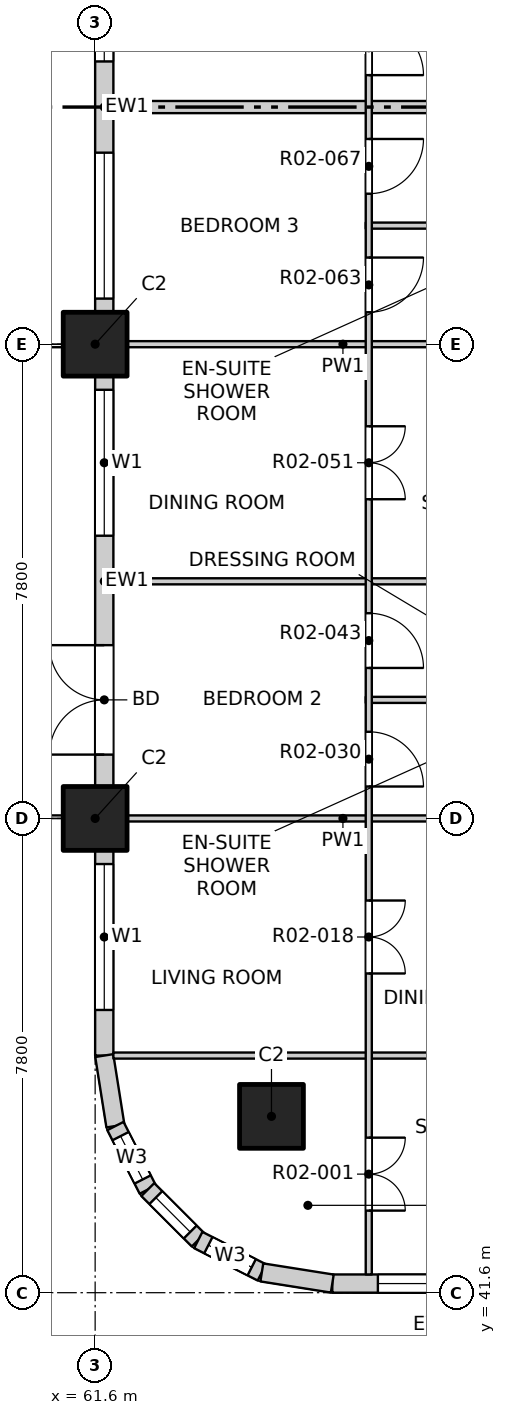
"""IFC4 building model, lengths in metres.
Left out: names, types, materials, properties, quantities, classifications, styles, units other than length and angle.
Written with IfcOpenShell. Run it as: python <this file> out.ifc"""

import sys

from ifc_helpers import new_model, si_unit, direction, frame, frame_2d, origin, origin_2d, place, context, subcontext, project, spatial, rectangle, extrude, element, fill, save


model = new_model("IFC4")
c1 = context("Model", 3, precision=1e-05, world=origin(), true_north=direction((0.0, 1.0)))
c2 = subcontext(c1, "Body", "Model", "MODEL_VIEW")
j1 = project(units=[si_unit("LENGTHUNIT", "METRE"), si_unit("PLANEANGLEUNIT", "RADIAN")], contexts=[c1])
p1 = place(None, origin())
s1 = spatial("IfcSite", under=j1, at=p1, CompositionType="ELEMENT")
p2 = place(p1, origin())
s2 = spatial("IfcBuilding", under=s1, at=p2, CompositionType="ELEMENT")
p3 = place(p2, frame((0.0, 0.0, 29.7)))
s3 = spatial("IfcBuildingStorey", under=s2, at=p3, CompositionType="ELEMENT", Elevation=29.7)
for number, where, z_axis, x_axis in (
    (1, (64.5, 44.5, -0.25), (0.0, 0.0, 1.0), (1.0, 0.0, 0.0)),
    (2, (61.6, 49.4, -0.25), (0.0, 0.0, 1.0), (1.0, 0.0, 0.0)),
    (3, (61.6, 57.2, -0.25), (0.0, 0.0, 1.0), (1.0, 0.0, 0.0)),
):
    element("IfcColumn", number, at=place(p3, frame(where, z_axis=z_axis, x_axis=x_axis)), inside=s3, PredefinedType="COLUMN", context=c2, shape_type="SweptSolid", body=[
        extrude(rectangle(XDim=1.05, YDim=1.05, at=origin_2d()), origin(), (0.0, 0.0, 1.0), 3.4),
    ])
p4 = place(p3, frame((65.5, 41.75, 0.0), z_axis=(0.0, 0.0, 1.0), x_axis=(1.0, 0.0, 0.0)))
e4 = element("IfcWall", 4, at=p4, inside=s3, PredefinedType="SOLIDWALL", context=c2, shape_type="SweptSolid", body=[
    extrude(rectangle(XDim=3.375, YDim=0.3, at=frame_2d((1.688, 0.0))), origin(), (0.0, 0.0, 1.0), 2.7),
])
p5 = place(p4, frame((0.75, 0.0, 0.9)))
e5 = element("IfcOpeningElement", 5, at=p5, cuts=e4, PredefinedType="OPENING", context=c2, shape_type="SweptSolid", body=[
    extrude(rectangle(XDim=2.4, YDim=1.8, at=frame_2d((1.2, 0.9))), frame((0.0, 0.16, 0.0), z_axis=(0.0, -1.0, 0.0), x_axis=(1.0, 0.0, 0.0)), (0.0, 0.0, 1.0), 0.32),
])
p6 = place(p3, frame((61.75, 45.5, 0.0), z_axis=(0.0, 0.0, 1.0), x_axis=(0.0, 1.0, 0.0)))
e6 = element("IfcWall", 6, at=p6, inside=s3, PredefinedType="SOLIDWALL", context=c2, shape_type="SweptSolid", body=[
    extrude(rectangle(XDim=3.375, YDim=0.3, at=frame_2d((1.688, 0.0))), origin(), (0.0, 0.0, 1.0), 2.7),
])
p7 = place(p6, frame((0.75, 0.0, 0.9)))
e7 = element("IfcOpeningElement", 7, at=p7, cuts=e6, PredefinedType="OPENING", context=c2, shape_type="SweptSolid", body=[
    extrude(rectangle(XDim=2.4, YDim=1.8, at=frame_2d((1.2, 0.9))), frame((0.0, 0.16, 0.0), z_axis=(0.0, -1.0, 0.0), x_axis=(1.0, 0.0, 0.0)), (0.0, 0.0, 1.0), 0.32),
])
p8 = place(p3, frame((61.75, 49.925, 0.0), z_axis=(0.0, 0.0, 1.0), x_axis=(0.0, 1.0, 0.0)))
e8 = element("IfcWall", 8, at=p8, inside=s3, PredefinedType="SOLIDWALL", context=c2, shape_type="SweptSolid", body=[
    extrude(rectangle(XDim=6.75, YDim=0.3, at=frame_2d((3.375, 0.0))), origin(), (0.0, 0.0, 1.0), 2.7),
])
p9 = place(p8, frame((0.525, 0.0, 0.0)))
e9 = element("IfcOpeningElement", 9, at=p9, cuts=e8, PredefinedType="OPENING", context=c2, shape_type="SweptSolid", body=[
    extrude(rectangle(XDim=1.8, YDim=2.4, at=frame_2d((0.9, 1.2))), frame((0.0, 0.16, 0.0), z_axis=(0.0, -1.0, 0.0), x_axis=(1.0, 0.0, 0.0)), (0.0, 0.0, 1.0), 0.32),
])
p10 = place(p8, frame((4.125, 0.0, 0.9)))
e10 = element("IfcOpeningElement", 10, at=p10, cuts=e8, PredefinedType="OPENING", context=c2, shape_type="SweptSolid", body=[
    extrude(rectangle(XDim=2.4, YDim=1.8, at=frame_2d((1.2, 0.9))), frame((0.0, 0.16, 0.0), z_axis=(0.0, -1.0, 0.0), x_axis=(1.0, 0.0, 0.0)), (0.0, 0.0, 1.0), 0.32),
])
p11 = place(p3, frame((61.75, 57.725, 0.0), z_axis=(0.0, 0.0, 1.0), x_axis=(0.0, 1.0, 0.0)))
e11 = element("IfcWall", 11, at=p11, inside=s3, PredefinedType="SOLIDWALL", context=c2, shape_type="SweptSolid", body=[
    extrude(rectangle(XDim=6.75, YDim=0.3, at=frame_2d((3.375, 0.0))), origin(), (0.0, 0.0, 1.0), 2.7),
])
p12 = place(p11, frame((0.225, 0.0, 0.9)))
e12 = element("IfcOpeningElement", 12, at=p12, cuts=e11, PredefinedType="OPENING", context=c2, shape_type="SweptSolid", body=[
    extrude(rectangle(XDim=2.4, YDim=1.8, at=frame_2d((1.2, 0.9))), frame((0.0, 0.16, 0.0), z_axis=(0.0, -1.0, 0.0), x_axis=(1.0, 0.0, 0.0)), (0.0, 0.0, 1.0), 0.32),
])
p13 = place(p11, frame((4.125, 0.0, 0.9)))
e13 = element("IfcOpeningElement", 13, at=p13, cuts=e11, PredefinedType="OPENING", context=c2, shape_type="SweptSolid", body=[
    extrude(rectangle(XDim=2.4, YDim=1.8, at=frame_2d((1.2, 0.9))), frame((0.0, 0.16, 0.0), z_axis=(0.0, -1.0, 0.0), x_axis=(1.0, 0.0, 0.0)), (0.0, 0.0, 1.0), 0.32),
])
p14 = place(p3, frame((61.75, 45.5, 0.0), z_axis=(0.0, 0.0, 1.0), x_axis=(0.156496880861, -0.987678452879, 0.0)))
e14 = element("IfcWall", 14, at=p14, inside=s3, PredefinedType="SOLIDWALL", context=c2, shape_type="SweptSolid", body=[
    extrude(rectangle(XDim=1.173, YDim=0.3, at=frame_2d((0.586, 0.0))), origin(), (0.0, 0.0, 1.0), 2.7),
])
p15 = place(p3, frame((61.934, 44.341, 0.0), z_axis=(0.0, 0.0, 1.0), x_axis=(0.454025524128, -0.890988677504, 0.0)))
e15 = element("IfcWall", 15, at=p15, inside=s3, PredefinedType="SOLIDWALL", context=c2, shape_type="SweptSolid", body=[
    extrude(rectangle(XDim=1.173, YDim=0.3, at=frame_2d((0.587, 0.0))), origin(), (0.0, 0.0, 1.0), 2.7),
])
p16 = place(p15, frame((0.187, 0.0, 0.9)))
e16 = element("IfcOpeningElement", 16, at=p16, cuts=e15, PredefinedType="OPENING", context=c2, shape_type="SweptSolid", body=[
    extrude(rectangle(XDim=0.8, YDim=1.2, at=frame_2d((0.4, 0.6))), frame((0.0, 0.16, 0.0), z_axis=(0.0, -1.0, 0.0), x_axis=(1.0, 0.0, 0.0)), (0.0, 0.0, 1.0), 0.32),
])
p17 = place(p3, frame((62.466, 43.296, 0.0), z_axis=(0.0, 0.0, 1.0), x_axis=(0.707106781187, -0.707106781187, 0.0)))
e17 = element("IfcWall", 17, at=p17, inside=s3, PredefinedType="SOLIDWALL", context=c2, shape_type="SweptSolid", body=[
    extrude(rectangle(XDim=1.173, YDim=0.3, at=frame_2d((0.586, 0.0))), origin(), (0.0, 0.0, 1.0), 2.7),
])
p18 = place(p17, frame((0.187, 0.0, 0.9)))
e18 = element("IfcOpeningElement", 18, at=p18, cuts=e17, PredefinedType="OPENING", context=c2, shape_type="SweptSolid", body=[
    extrude(rectangle(XDim=0.8, YDim=1.2, at=frame_2d((0.4, 0.6))), frame((0.0, 0.16, 0.0), z_axis=(0.0, -1.0, 0.0), x_axis=(1.0, 0.0, 0.0)), (0.0, 0.0, 1.0), 0.32),
])
p19 = place(p3, frame((63.296, 42.466, 0.0), z_axis=(0.0, 0.0, 1.0), x_axis=(0.890988677504, -0.454025524128, 0.0)))
e19 = element("IfcWall", 19, at=p19, inside=s3, PredefinedType="SOLIDWALL", context=c2, shape_type="SweptSolid", body=[
    extrude(rectangle(XDim=1.173, YDim=0.3, at=frame_2d((0.587, 0.0))), origin(), (0.0, 0.0, 1.0), 2.7),
])
p20 = place(p19, frame((0.187, 0.0, 0.9)))
e20 = element("IfcOpeningElement", 20, at=p20, cuts=e19, PredefinedType="OPENING", context=c2, shape_type="SweptSolid", body=[
    extrude(rectangle(XDim=0.8, YDim=1.2, at=frame_2d((0.4, 0.6))), frame((0.0, 0.16, 0.0), z_axis=(0.0, -1.0, 0.0), x_axis=(1.0, 0.0, 0.0)), (0.0, 0.0, 1.0), 0.32),
])
p21 = place(p3, frame((64.341, 41.934, 0.0), z_axis=(0.0, 0.0, 1.0), x_axis=(0.987678452879, -0.156496880861, 0.0)))
e21 = element("IfcWall", 21, at=p21, inside=s3, PredefinedType="SOLIDWALL", context=c2, shape_type="SweptSolid", body=[
    extrude(rectangle(XDim=1.173, YDim=0.3, at=frame_2d((0.586, 0.0))), origin(), (0.0, 0.0, 1.0), 2.7),
])
p22 = place(p3, frame((61.9, 45.5, 0.0), z_axis=(0.0, 0.0, 1.0), x_axis=(1.0, 0.0, 0.0)))
e22 = element("IfcWall", 22, at=p22, inside=s3, PredefinedType="PARTITIONING", context=c2, shape_type="SweptSolid", body=[
    extrude(rectangle(XDim=11.5, YDim=0.1, at=frame_2d((5.75, 0.0))), origin(), (0.0, 0.0, 1.0), 3.15),
])
p23 = place(p22, frame((7.965, 0.0, 0.0)))
e23 = element("IfcOpeningElement", 23, at=p23, cuts=e22, PredefinedType="OPENING", context=c2, shape_type="SweptSolid", body=[
    extrude(rectangle(XDim=0.9, YDim=2.1, at=frame_2d((0.45, 1.05))), frame((0.0, 0.06, 0.0), z_axis=(0.0, -1.0, 0.0), x_axis=(1.0, 0.0, 0.0)), (0.0, 0.0, 1.0), 0.12),
])
p24 = place(p3, frame((61.9, 49.4, 0.0), z_axis=(0.0, 0.0, 1.0), x_axis=(1.0, 0.0, 0.0)))
e24 = element("IfcWall", 24, at=p24, inside=s3, PredefinedType="PARTITIONING", context=c2, shape_type="SweptSolid", body=[
    extrude(rectangle(XDim=7.55, YDim=0.1, at=frame_2d((3.775, 0.0))), origin(), (0.0, 0.0, 1.0), 2.55),
])
p25 = place(p3, frame((66.05, 51.35, 0.0), z_axis=(0.0, 0.0, 1.0), x_axis=(1.0, 0.0, 0.0)))
e25 = element("IfcWall", 25, at=p25, inside=s3, PredefinedType="PARTITIONING", context=c2, shape_type="SweptSolid", body=[
    extrude(rectangle(XDim=3.4, YDim=0.1, at=frame_2d((1.7, 0.0))), origin(), (0.0, 0.0, 1.0), 3.15),
])
p26 = place(p3, frame((61.9, 53.3, 0.0), z_axis=(0.0, 0.0, 1.0), x_axis=(1.0, 0.0, 0.0)))
e26 = element("IfcWall", 26, at=p26, inside=s3, PredefinedType="PARTITIONING", context=c2, shape_type="SweptSolid", body=[
    extrude(rectangle(XDim=7.55, YDim=0.1, at=frame_2d((3.775, 0.0))), origin(), (0.0, 0.0, 1.0), 3.15),
])
p27 = place(p3, frame((61.9, 57.2, 0.0), z_axis=(0.0, 0.0, 1.0), x_axis=(1.0, 0.0, 0.0)))
e27 = element("IfcWall", 27, at=p27, inside=s3, PredefinedType="PARTITIONING", context=c2, shape_type="SweptSolid", body=[
    extrude(rectangle(XDim=7.55, YDim=0.1, at=frame_2d((3.775, 0.0))), origin(), (0.0, 0.0, 1.0), 2.55),
])
p28 = place(p3, frame((66.05, 59.15, 0.0), z_axis=(0.0, 0.0, 1.0), x_axis=(1.0, 0.0, 0.0)))
e28 = element("IfcWall", 28, at=p28, inside=s3, PredefinedType="PARTITIONING", context=c2, shape_type="SweptSolid", body=[
    extrude(rectangle(XDim=3.4, YDim=0.1, at=frame_2d((1.7, 0.0))), origin(), (0.0, 0.0, 1.0), 3.15),
])
p29 = place(p3, frame((61.9, 61.1, 0.0), z_axis=(0.0, 0.0, 1.0), x_axis=(1.0, 0.0, 0.0)))
e29 = element("IfcWall", 29, at=p29, inside=s3, PredefinedType="PARTITIONING", context=c2, shape_type="SweptSolid", body=[
    extrude(rectangle(XDim=11.5, YDim=0.2, at=frame_2d((5.75, 0.0))), origin(), (0.0, 0.0, 1.0), 3.15),
])
p30 = place(p3, frame((66.1, 41.9, 0.0), z_axis=(0.0, 0.0, 1.0), x_axis=(0.0, 1.0, 0.0)))
e30 = element("IfcWall", 30, at=p30, inside=s3, PredefinedType="PARTITIONING", context=c2, shape_type="SweptSolid", body=[
    extrude(rectangle(XDim=34.7, YDim=0.1, at=frame_2d((17.35, 0.0))), origin(), (0.0, 0.0, 1.0), 3.15),
])
p31 = place(p30, frame((1.05, 0.0, 0.0)))
e31 = element("IfcOpeningElement", 31, at=p31, cuts=e30, PredefinedType="OPENING", context=c2, shape_type="SweptSolid", body=[
    extrude(rectangle(XDim=1.2, YDim=2.1, at=frame_2d((0.6, 1.05))), frame((0.0, 0.06, 0.0), z_axis=(0.0, -1.0, 0.0), x_axis=(1.0, 0.0, 0.0)), (0.0, 0.0, 1.0), 0.12),
])
p32 = place(p30, frame((4.95, 0.0, 0.0)))
e32 = element("IfcOpeningElement", 32, at=p32, cuts=e30, PredefinedType="OPENING", context=c2, shape_type="SweptSolid", body=[
    extrude(rectangle(XDim=1.2, YDim=2.1, at=frame_2d((0.6, 1.05))), frame((0.0, 0.06, 0.0), z_axis=(0.0, -1.0, 0.0), x_axis=(1.0, 0.0, 0.0)), (0.0, 0.0, 1.0), 0.12),
])
p33 = place(p30, frame((8.025, 0.0, 0.0)))
e33 = element("IfcOpeningElement", 33, at=p33, cuts=e30, PredefinedType="OPENING", context=c2, shape_type="SweptSolid", body=[
    extrude(rectangle(XDim=0.9, YDim=2.1, at=frame_2d((0.45, 1.05))), frame((0.0, 0.06, 0.0), z_axis=(0.0, -1.0, 0.0), x_axis=(1.0, 0.0, 0.0)), (0.0, 0.0, 1.0), 0.12),
])
p34 = place(p30, frame((9.975, 0.0, 0.0)))
e34 = element("IfcOpeningElement", 34, at=p34, cuts=e30, PredefinedType="OPENING", context=c2, shape_type="SweptSolid", body=[
    extrude(rectangle(XDim=0.9, YDim=2.1, at=frame_2d((0.45, 1.05))), frame((0.0, 0.06, 0.0), z_axis=(0.0, -1.0, 0.0), x_axis=(1.0, 0.0, 0.0)), (0.0, 0.0, 1.0), 0.12),
])
p35 = place(p30, frame((12.75, 0.0, 0.0)))
e35 = element("IfcOpeningElement", 35, at=p35, cuts=e30, PredefinedType="OPENING", context=c2, shape_type="SweptSolid", body=[
    extrude(rectangle(XDim=1.2, YDim=2.1, at=frame_2d((0.6, 1.05))), frame((0.0, 0.06, 0.0), z_axis=(0.0, -1.0, 0.0), x_axis=(1.0, 0.0, 0.0)), (0.0, 0.0, 1.0), 0.12),
])
p36 = place(p30, frame((15.825, 0.0, 0.0)))
e36 = element("IfcOpeningElement", 36, at=p36, cuts=e30, PredefinedType="OPENING", context=c2, shape_type="SweptSolid", body=[
    extrude(rectangle(XDim=0.9, YDim=2.1, at=frame_2d((0.45, 1.05))), frame((0.0, 0.06, 0.0), z_axis=(0.0, -1.0, 0.0), x_axis=(1.0, 0.0, 0.0)), (0.0, 0.0, 1.0), 0.12),
])
p37 = place(p30, frame((17.775, 0.0, 0.0)))
e37 = element("IfcOpeningElement", 37, at=p37, cuts=e30, PredefinedType="OPENING", context=c2, shape_type="SweptSolid", body=[
    extrude(rectangle(XDim=0.9, YDim=2.1, at=frame_2d((0.45, 1.05))), frame((0.0, 0.06, 0.0), z_axis=(0.0, -1.0, 0.0), x_axis=(1.0, 0.0, 0.0)), (0.0, 0.0, 1.0), 0.12),
])
p38 = place(p30, frame((19.725, 0.0, 0.0)))
e38 = element("IfcOpeningElement", 38, at=p38, cuts=e30, PredefinedType="OPENING", context=c2, shape_type="SweptSolid", body=[
    extrude(rectangle(XDim=0.9, YDim=2.1, at=frame_2d((0.45, 1.05))), frame((0.0, 0.06, 0.0), z_axis=(0.0, -1.0, 0.0), x_axis=(1.0, 0.0, 0.0)), (0.0, 0.0, 1.0), 0.12),
])
p39 = place(p30, frame((21.675, 0.0, 0.0)))
e39 = element("IfcOpeningElement", 39, at=p39, cuts=e30, PredefinedType="OPENING", context=c2, shape_type="SweptSolid", body=[
    extrude(rectangle(XDim=0.9, YDim=2.1, at=frame_2d((0.45, 1.05))), frame((0.0, 0.06, 0.0), z_axis=(0.0, -1.0, 0.0), x_axis=(1.0, 0.0, 0.0)), (0.0, 0.0, 1.0), 0.12),
])
p40 = place(p30, frame((24.45, 0.0, 0.0)))
e40 = element("IfcOpeningElement", 40, at=p40, cuts=e30, PredefinedType="OPENING", context=c2, shape_type="SweptSolid", body=[
    extrude(rectangle(XDim=1.2, YDim=2.1, at=frame_2d((0.6, 1.05))), frame((0.0, 0.06, 0.0), z_axis=(0.0, -1.0, 0.0), x_axis=(1.0, 0.0, 0.0)), (0.0, 0.0, 1.0), 0.12),
])
p41 = place(p30, frame((27.525, 0.0, 0.0)))
e41 = element("IfcOpeningElement", 41, at=p41, cuts=e30, PredefinedType="OPENING", context=c2, shape_type="SweptSolid", body=[
    extrude(rectangle(XDim=0.9, YDim=2.1, at=frame_2d((0.45, 1.05))), frame((0.0, 0.06, 0.0), z_axis=(0.0, -1.0, 0.0), x_axis=(1.0, 0.0, 0.0)), (0.0, 0.0, 1.0), 0.12),
])
p42 = place(p30, frame((29.475, 0.0, 0.0)))
e42 = element("IfcOpeningElement", 42, at=p42, cuts=e30, PredefinedType="OPENING", context=c2, shape_type="SweptSolid", body=[
    extrude(rectangle(XDim=0.9, YDim=2.1, at=frame_2d((0.45, 1.05))), frame((0.0, 0.06, 0.0), z_axis=(0.0, -1.0, 0.0), x_axis=(1.0, 0.0, 0.0)), (0.0, 0.0, 1.0), 0.12),
])
p43 = place(p30, frame((31.425, 0.0, 0.0)))
e43 = element("IfcOpeningElement", 43, at=p43, cuts=e30, PredefinedType="OPENING", context=c2, shape_type="SweptSolid", body=[
    extrude(rectangle(XDim=0.9, YDim=2.1, at=frame_2d((0.45, 1.05))), frame((0.0, 0.06, 0.0), z_axis=(0.0, -1.0, 0.0), x_axis=(1.0, 0.0, 0.0)), (0.0, 0.0, 1.0), 0.12),
])
p44 = place(p30, frame((33.375, 0.0, 0.0)))
e44 = element("IfcOpeningElement", 44, at=p44, cuts=e30, PredefinedType="OPENING", context=c2, shape_type="SweptSolid", body=[
    extrude(rectangle(XDim=0.9, YDim=2.1, at=frame_2d((0.45, 1.05))), frame((0.0, 0.06, 0.0), z_axis=(0.0, -1.0, 0.0), x_axis=(1.0, 0.0, 0.0)), (0.0, 0.0, 1.0), 0.12),
])
p45 = place(p5, origin())
e45 = element("IfcWindow", 45, at=p45, inside=s3, PartitioningType="DOUBLE_PANEL_VERTICAL", PredefinedType="WINDOW", context=c2, shape_type="SweptSolid", body=[
    extrude(rectangle(XDim=2.4, YDim=1.8, at=frame_2d((1.2, 0.9))), frame((0.0, 0.03, 0.0), z_axis=(0.0, -1.0, 0.0), x_axis=(1.0, 0.0, 0.0)), (0.0, 0.0, 1.0), 0.06),
])
fill(e5, e45)
p46 = place(p7, origin())
e46 = element("IfcWindow", 46, at=p46, inside=s3, PartitioningType="DOUBLE_PANEL_VERTICAL", PredefinedType="WINDOW", context=c2, shape_type="SweptSolid", body=[
    extrude(rectangle(XDim=2.4, YDim=1.8, at=frame_2d((1.2, 0.9))), frame((0.0, 0.03, 0.0), z_axis=(0.0, -1.0, 0.0), x_axis=(1.0, 0.0, 0.0)), (0.0, 0.0, 1.0), 0.06),
])
fill(e7, e46)
p47 = place(p9, origin())
e47 = element("IfcDoor", 47, at=p47, inside=s3, OperationType="DOUBLE_DOOR_SINGLE_SWING", PredefinedType="DOOR", context=c2, shape_type="SweptSolid", body=[
    extrude(rectangle(XDim=1.8, YDim=2.4, at=frame_2d((0.9, 1.2))), frame((0.0, 0.025, 0.0), z_axis=(0.0, -1.0, 0.0), x_axis=(1.0, 0.0, 0.0)), (0.0, 0.0, 1.0), 0.05),
])
fill(e9, e47)
p48 = place(p10, origin())
e48 = element("IfcWindow", 48, at=p48, inside=s3, PartitioningType="DOUBLE_PANEL_VERTICAL", PredefinedType="WINDOW", context=c2, shape_type="SweptSolid", body=[
    extrude(rectangle(XDim=2.4, YDim=1.8, at=frame_2d((1.2, 0.9))), frame((0.0, 0.03, 0.0), z_axis=(0.0, -1.0, 0.0), x_axis=(1.0, 0.0, 0.0)), (0.0, 0.0, 1.0), 0.06),
])
fill(e10, e48)
p49 = place(p12, origin())
e49 = element("IfcWindow", 49, at=p49, inside=s3, PartitioningType="DOUBLE_PANEL_VERTICAL", PredefinedType="WINDOW", context=c2, shape_type="SweptSolid", body=[
    extrude(rectangle(XDim=2.4, YDim=1.8, at=frame_2d((1.2, 0.9))), frame((0.0, 0.03, 0.0), z_axis=(0.0, -1.0, 0.0), x_axis=(1.0, 0.0, 0.0)), (0.0, 0.0, 1.0), 0.06),
])
fill(e12, e49)
p50 = place(p13, origin())
e50 = element("IfcWindow", 50, at=p50, inside=s3, PartitioningType="DOUBLE_PANEL_VERTICAL", PredefinedType="WINDOW", context=c2, shape_type="SweptSolid", body=[
    extrude(rectangle(XDim=2.4, YDim=1.8, at=frame_2d((1.2, 0.9))), frame((0.0, 0.03, 0.0), z_axis=(0.0, -1.0, 0.0), x_axis=(1.0, 0.0, 0.0)), (0.0, 0.0, 1.0), 0.06),
])
fill(e13, e50)
p51 = place(p16, origin())
e51 = element("IfcWindow", 51, at=p51, inside=s3, PartitioningType="SINGLE_PANEL", PredefinedType="WINDOW", context=c2, shape_type="SweptSolid", body=[
    extrude(rectangle(XDim=0.8, YDim=1.2, at=frame_2d((0.4, 0.6))), frame((0.0, 0.03, 0.0), z_axis=(0.0, -1.0, 0.0), x_axis=(1.0, 0.0, 0.0)), (0.0, 0.0, 1.0), 0.06),
])
fill(e16, e51)
p52 = place(p18, origin())
e52 = element("IfcWindow", 52, at=p52, inside=s3, PartitioningType="SINGLE_PANEL", PredefinedType="WINDOW", context=c2, shape_type="SweptSolid", body=[
    extrude(rectangle(XDim=0.8, YDim=1.2, at=frame_2d((0.4, 0.6))), frame((0.0, 0.03, 0.0), z_axis=(0.0, -1.0, 0.0), x_axis=(1.0, 0.0, 0.0)), (0.0, 0.0, 1.0), 0.06),
])
fill(e18, e52)
p53 = place(p20, origin())
e53 = element("IfcWindow", 53, at=p53, inside=s3, PartitioningType="SINGLE_PANEL", PredefinedType="WINDOW", context=c2, shape_type="SweptSolid", body=[
    extrude(rectangle(XDim=0.8, YDim=1.2, at=frame_2d((0.4, 0.6))), frame((0.0, 0.03, 0.0), z_axis=(0.0, -1.0, 0.0), x_axis=(1.0, 0.0, 0.0)), (0.0, 0.0, 1.0), 0.06),
])
fill(e20, e53)
p54 = place(p31, origin())
e54 = element("IfcDoor", 54, at=p54, inside=s3, OperationType="DOUBLE_DOOR_SINGLE_SWING", PredefinedType="DOOR", context=c2, shape_type="SweptSolid", body=[
    extrude(rectangle(XDim=1.2, YDim=2.1, at=frame_2d((0.6, 1.05))), frame((0.0, 0.025, 0.0), z_axis=(0.0, -1.0, 0.0), x_axis=(1.0, 0.0, 0.0)), (0.0, 0.0, 1.0), 0.05),
])
fill(e31, e54)
p55 = place(p32, origin())
e55 = element("IfcDoor", 55, at=p55, inside=s3, OperationType="DOUBLE_DOOR_SINGLE_SWING", PredefinedType="DOOR", context=c2, shape_type="SweptSolid", body=[
    extrude(rectangle(XDim=1.2, YDim=2.1, at=frame_2d((0.6, 1.05))), frame((0.0, 0.025, 0.0), z_axis=(0.0, -1.0, 0.0), x_axis=(1.0, 0.0, 0.0)), (0.0, 0.0, 1.0), 0.05),
])
fill(e32, e55)
p56 = place(p33, origin())
e56 = element("IfcDoor", 56, at=p56, inside=s3, OperationType="SINGLE_SWING_RIGHT", PredefinedType="DOOR", context=c2, shape_type="SweptSolid", body=[
    extrude(rectangle(XDim=0.9, YDim=2.1, at=frame_2d((0.45, 1.05))), frame((0.0, 0.025, 0.0), z_axis=(0.0, -1.0, 0.0), x_axis=(1.0, 0.0, 0.0)), (0.0, 0.0, 1.0), 0.05),
])
fill(e33, e56)
p57 = place(p34, origin())
e57 = element("IfcDoor", 57, at=p57, inside=s3, OperationType="SINGLE_SWING_RIGHT", PredefinedType="DOOR", context=c2, shape_type="SweptSolid", body=[
    extrude(rectangle(XDim=0.9, YDim=2.1, at=frame_2d((0.45, 1.05))), frame((0.0, 0.025, 0.0), z_axis=(0.0, -1.0, 0.0), x_axis=(1.0, 0.0, 0.0)), (0.0, 0.0, 1.0), 0.05),
])
fill(e34, e57)
p58 = place(p35, origin())
e58 = element("IfcDoor", 58, at=p58, inside=s3, OperationType="DOUBLE_DOOR_SINGLE_SWING", PredefinedType="DOOR", context=c2, shape_type="SweptSolid", body=[
    extrude(rectangle(XDim=1.2, YDim=2.1, at=frame_2d((0.6, 1.05))), frame((0.0, 0.025, 0.0), z_axis=(0.0, -1.0, 0.0), x_axis=(1.0, 0.0, 0.0)), (0.0, 0.0, 1.0), 0.05),
])
fill(e35, e58)
p59 = place(p36, origin())
e59 = element("IfcDoor", 59, at=p59, inside=s3, OperationType="SINGLE_SWING_LEFT", PredefinedType="DOOR", context=c2, shape_type="SweptSolid", body=[
    extrude(rectangle(XDim=0.9, YDim=2.1, at=frame_2d((0.45, 1.05))), frame((0.0, 0.025, 0.0), z_axis=(0.0, -1.0, 0.0), x_axis=(1.0, 0.0, 0.0)), (0.0, 0.0, 1.0), 0.05),
])
fill(e36, e59)
p60 = place(p37, origin())
e60 = element("IfcDoor", 60, at=p60, inside=s3, OperationType="SINGLE_SWING_LEFT", PredefinedType="DOOR", context=c2, shape_type="SweptSolid", body=[
    extrude(rectangle(XDim=0.9, YDim=2.1, at=frame_2d((0.45, 1.05))), frame((0.0, 0.025, 0.0), z_axis=(0.0, -1.0, 0.0), x_axis=(1.0, 0.0, 0.0)), (0.0, 0.0, 1.0), 0.05),
])
fill(e37, e60)
p61 = place(p38, origin())
e61 = element("IfcDoor", 61, at=p61, inside=s3, OperationType="SINGLE_SWING_RIGHT", PredefinedType="DOOR", context=c2, shape_type="SweptSolid", body=[
    extrude(rectangle(XDim=0.9, YDim=2.1, at=frame_2d((0.45, 1.05))), frame((0.0, 0.025, 0.0), z_axis=(0.0, -1.0, 0.0), x_axis=(1.0, 0.0, 0.0)), (0.0, 0.0, 1.0), 0.05),
])
fill(e38, e61)
save(model, sys.argv[1])
